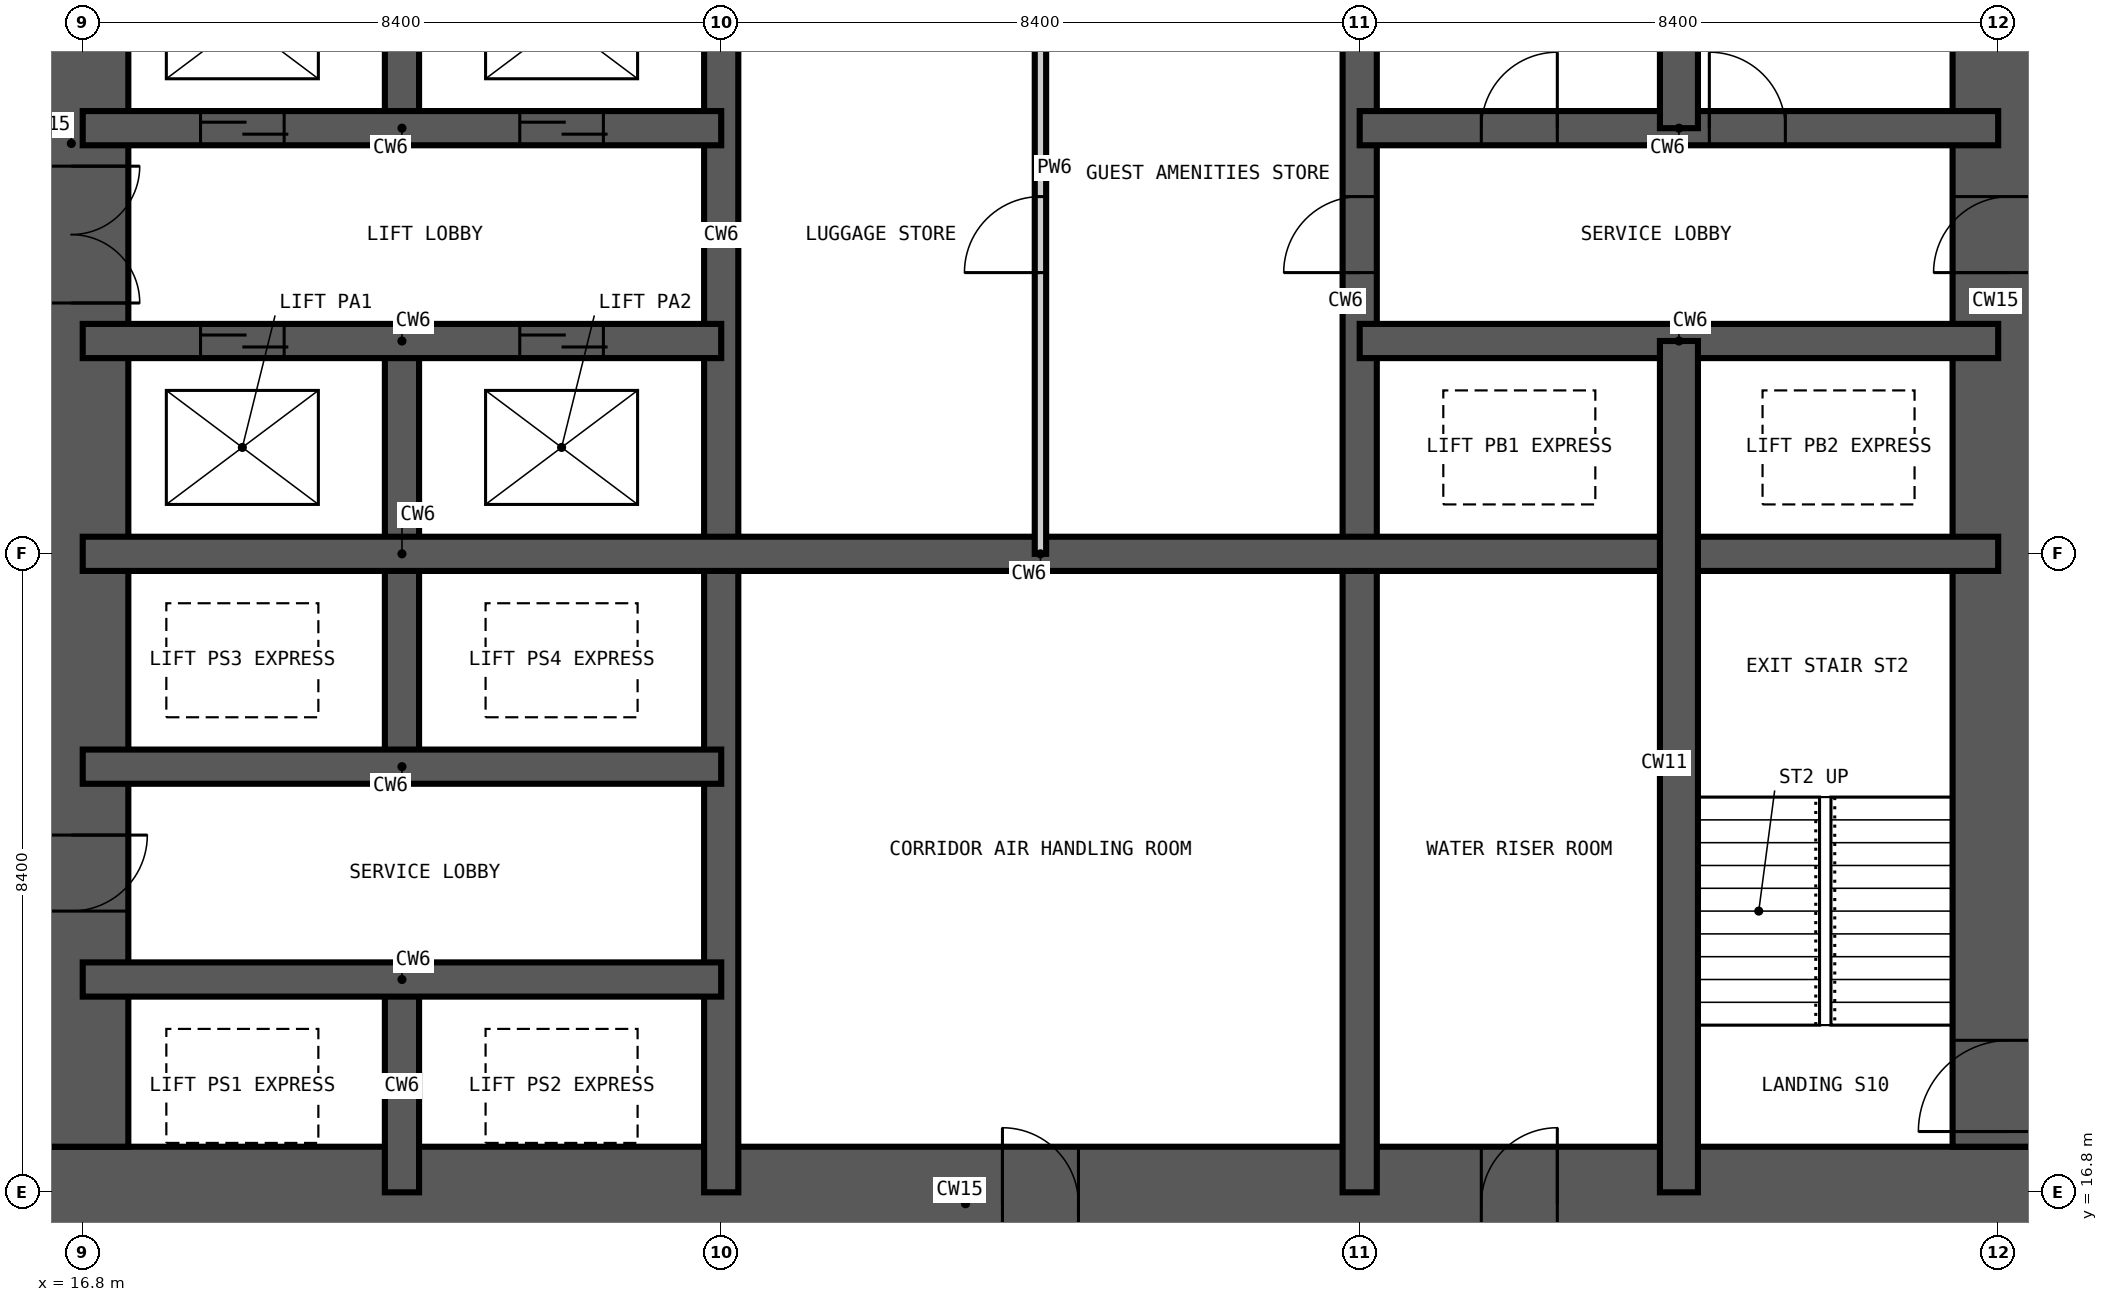
"""IFC4 building model, lengths in metres.
Left out: names, types, materials, properties, quantities, classifications, styles, units other than length and angle.
Written with IfcOpenShell. Run it as: python <this file> out.ifc"""

import sys

from ifc_helpers import new_model, si_unit, direction, frame, frame_2d, origin, place, context, subcontext, project, spatial, rectangle, extrude, element, fill, save


model = new_model("IFC4")
c1 = context("Model", 3, precision=1e-05, world=origin(), true_north=direction((0.0, 1.0)))
c2 = subcontext(c1, "Body", "Model", "MODEL_VIEW")
j1 = project(units=[si_unit("LENGTHUNIT", "METRE"), si_unit("PLANEANGLEUNIT", "RADIAN")], contexts=[c1])
p1 = place(None, origin())
s1 = spatial("IfcSite", under=j1, at=p1, CompositionType="ELEMENT")
p2 = place(p1, origin())
s2 = spatial("IfcBuilding", under=s1, at=p2, CompositionType="ELEMENT")
p3 = place(p2, frame((0.0, 0.0, 81.0)))
s3 = spatial("IfcBuildingStorey", under=s2, at=p3, CompositionType="ELEMENT", Elevation=81.0)
p4 = place(p3, frame((15.9, 16.65, -0.35), z_axis=(0.0, 0.0, 1.0), x_axis=(1.0, 0.0, 0.0)))
e1 = element("IfcWall", 1, at=p4, inside=s3, PredefinedType="SHEAR", context=c2, shape_type="SweptSolid", body=[
    extrude(rectangle(XDim=27.0, YDim=1.5, at=frame_2d((13.5, 0.0))), origin(), (0.0, 0.0, 1.0), 3.6),
])
p5 = place(p4, frame((13.0, 0.0, 0.35)))
e2 = element("IfcOpeningElement", 2, at=p5, cuts=e1, PredefinedType="OPENING", context=c2, shape_type="SweptSolid", body=[
    extrude(rectangle(XDim=1.0, YDim=2.1, at=frame_2d((0.5, 1.05))), frame((0.0, 0.76, 0.0), z_axis=(0.0, -1.0, 0.0), x_axis=(1.0, 0.0, 0.0)), (0.0, 0.0, 1.0), 1.52),
])
p6 = place(p4, frame((19.3, 0.0, 0.35)))
e3 = element("IfcOpeningElement", 3, at=p6, cuts=e1, PredefinedType="OPENING", context=c2, shape_type="SweptSolid", body=[
    extrude(rectangle(XDim=1.0, YDim=2.1, at=frame_2d((0.5, 1.05))), frame((0.0, 0.76, 0.0), z_axis=(0.0, -1.0, 0.0), x_axis=(1.0, 0.0, 0.0)), (0.0, 0.0, 1.0), 1.52),
])
p7 = place(p3, frame((42.15, 17.4, -0.35), z_axis=(0.0, 0.0, 1.0), x_axis=(0.0, 1.0, 0.0)))
e4 = element("IfcWall", 4, at=p7, inside=s3, PredefinedType="SHEAR", context=c2, shape_type="SweptSolid", body=[
    extrude(rectangle(XDim=24.0, YDim=1.5, at=frame_2d((12.0, 0.0))), origin(), (0.0, 0.0, 1.0), 3.6),
])
p8 = place(p7, frame((0.2, 0.0, 0.35)))
e5 = element("IfcOpeningElement", 5, at=p8, cuts=e4, PredefinedType="OPENING", context=c2, shape_type="SweptSolid", body=[
    extrude(rectangle(XDim=1.2, YDim=2.2, at=frame_2d((0.6, 1.1))), frame((0.0, 0.76, 0.0), z_axis=(0.0, -1.0, 0.0), x_axis=(1.0, 0.0, 0.0)), (0.0, 0.0, 1.0), 1.52),
])
p9 = place(p7, frame((11.5, 0.0, 0.35)))
e6 = element("IfcOpeningElement", 6, at=p9, cuts=e4, PredefinedType="OPENING", context=c2, shape_type="SweptSolid", body=[
    extrude(rectangle(XDim=1.0, YDim=2.1, at=frame_2d((0.5, 1.05))), frame((0.0, 0.76, 0.0), z_axis=(0.0, -1.0, 0.0), x_axis=(1.0, 0.0, 0.0)), (0.0, 0.0, 1.0), 1.52),
])
p10 = place(p7, frame((19.9, 0.0, 0.35)))
e7 = element("IfcOpeningElement", 7, at=p10, cuts=e4, PredefinedType="OPENING", context=c2, shape_type="SweptSolid", body=[
    extrude(rectangle(XDim=1.0, YDim=2.1, at=frame_2d((0.5, 1.05))), frame((0.0, 0.76, 0.0), z_axis=(0.0, -1.0, 0.0), x_axis=(1.0, 0.0, 0.0)), (0.0, 0.0, 1.0), 1.52),
])
p11 = place(p3, frame((16.65, 41.4, -0.35), z_axis=(0.0, 0.0, 1.0), x_axis=(0.0, -1.0, 0.0)))
e8 = element("IfcWall", 8, at=p11, inside=s3, PredefinedType="SHEAR", context=c2, shape_type="SweptSolid", body=[
    extrude(rectangle(XDim=24.0, YDim=1.5, at=frame_2d((12.0, 0.0))), origin(), (0.0, 0.0, 1.0), 3.6),
])
p12 = place(p11, frame((11.1, 0.0, 0.35)))
e9 = element("IfcOpeningElement", 9, at=p12, cuts=e8, PredefinedType="OPENING", context=c2, shape_type="SweptSolid", body=[
    extrude(rectangle(XDim=1.8, YDim=2.2, at=frame_2d((0.9, 1.1))), frame((0.0, 0.76, 0.0), z_axis=(0.0, -1.0, 0.0), x_axis=(1.0, 0.0, 0.0)), (0.0, 0.0, 1.0), 1.52),
])
p13 = place(p11, frame((19.9, 0.0, 0.35)))
e10 = element("IfcOpeningElement", 10, at=p13, cuts=e8, PredefinedType="OPENING", context=c2, shape_type="SweptSolid", body=[
    extrude(rectangle(XDim=1.0, YDim=2.1, at=frame_2d((0.5, 1.05))), frame((0.0, 0.76, 0.0), z_axis=(0.0, -1.0, 0.0), x_axis=(1.0, 0.0, 0.0)), (0.0, 0.0, 1.0), 1.52),
])
p14 = place(p11, frame((5.2, 0.0, 0.35)))
e11 = element("IfcOpeningElement", 11, at=p14, cuts=e8, PredefinedType="OPENING", context=c2, shape_type="SweptSolid", body=[
    extrude(rectangle(XDim=1.0, YDim=2.1, at=frame_2d((0.5, 1.05))), frame((0.0, 0.76, 0.0), z_axis=(0.0, -1.0, 0.0), x_axis=(1.0, 0.0, 0.0)), (0.0, 0.0, 1.0), 1.52),
])
p15 = place(p3, frame((21.0, 16.8, -0.35), z_axis=(0.0, 0.0, 1.0), x_axis=(0.0, 1.0, 0.0)))
e12 = element("IfcWall", 12, at=p15, inside=s3, PredefinedType="SHEAR", context=c2, shape_type="SweptSolid", body=[
    extrude(rectangle(XDim=2.8, YDim=0.45, at=frame_2d((1.4, 0.0))), origin(), (0.0, 0.0, 1.0), 3.6),
])
p16 = place(p3, frame((21.0, 22.4, -0.35), z_axis=(0.0, 0.0, 1.0), x_axis=(0.0, 1.0, 0.0)))
e13 = element("IfcWall", 13, at=p16, inside=s3, PredefinedType="SHEAR", context=c2, shape_type="SweptSolid", body=[
    extrude(rectangle(XDim=5.6, YDim=0.45, at=frame_2d((2.8, 0.0))), origin(), (0.0, 0.0, 1.0), 3.6),
])
p17 = place(p3, frame((21.0, 30.8, -0.35), z_axis=(0.0, 0.0, 1.0), x_axis=(0.0, 1.0, 0.0)))
e14 = element("IfcWall", 14, at=p17, inside=s3, PredefinedType="SHEAR", context=c2, shape_type="SweptSolid", body=[
    extrude(rectangle(XDim=2.8, YDim=0.45, at=frame_2d((1.4, 0.0))), origin(), (0.0, 0.0, 1.0), 3.6),
])
p18 = place(p3, frame((25.2, 16.8, -0.35), z_axis=(0.0, 0.0, 1.0), x_axis=(0.0, 1.0, 0.0)))
e15 = element("IfcWall", 15, at=p18, inside=s3, PredefinedType="SHEAR", context=c2, shape_type="SweptSolid", body=[
    extrude(rectangle(XDim=25.2, YDim=0.45, at=frame_2d((12.6, 0.0))), origin(), (0.0, 0.0, 1.0), 3.6),
])
p19 = place(p3, frame((33.6, 16.8, -0.35), z_axis=(0.0, 0.0, 1.0), x_axis=(0.0, 1.0, 0.0)))
e16 = element("IfcWall", 16, at=p19, inside=s3, PredefinedType="SHEAR", context=c2, shape_type="SweptSolid", body=[
    extrude(rectangle(XDim=25.2, YDim=0.45, at=frame_2d((12.6, 0.0))), origin(), (0.0, 0.0, 1.0), 3.6),
])
p20 = place(p19, frame((22.5, 0.0, 0.35)))
e17 = element("IfcOpeningElement", 17, at=p20, cuts=e16, PredefinedType="OPENING", context=c2, shape_type="SweptSolid", body=[
    extrude(rectangle(XDim=1.2, YDim=2.2, at=frame_2d((0.6, 1.1))), frame((0.0, 0.235, 0.0), z_axis=(0.0, -1.0, 0.0), x_axis=(1.0, 0.0, 0.0)), (0.0, 0.0, 1.0), 0.47),
])
p21 = place(p19, frame((18.3, 0.0, 0.35)))
e18 = element("IfcOpeningElement", 18, at=p21, cuts=e16, PredefinedType="OPENING", context=c2, shape_type="SweptSolid", body=[
    extrude(rectangle(XDim=1.2, YDim=2.2, at=frame_2d((0.6, 1.1))), frame((0.0, 0.235, 0.0), z_axis=(0.0, -1.0, 0.0), x_axis=(1.0, 0.0, 0.0)), (0.0, 0.0, 1.0), 0.47),
])
p22 = place(p19, frame((12.1, 0.0, 0.35)))
e19 = element("IfcOpeningElement", 19, at=p22, cuts=e16, PredefinedType="OPENING", context=c2, shape_type="SweptSolid", body=[
    extrude(rectangle(XDim=1.0, YDim=2.1, at=frame_2d((0.5, 1.05))), frame((0.0, 0.235, 0.0), z_axis=(0.0, -1.0, 0.0), x_axis=(1.0, 0.0, 0.0)), (0.0, 0.0, 1.0), 0.47),
])
for number, where, z_axis, x_axis in (
    (20, (16.8, 19.6, -0.35), (0.0, 0.0, 1.0), (1.0, 0.0, 0.0)),
    (21, (16.8, 22.4, -0.35), (0.0, 0.0, 1.0), (1.0, 0.0, 0.0)),
):
    element("IfcWall", number, at=place(p3, frame(where, z_axis=z_axis, x_axis=x_axis)), inside=s3, PredefinedType="SHEAR", context=c2, shape_type="SweptSolid", body=[
        extrude(rectangle(XDim=8.4, YDim=0.45, at=frame_2d((4.2, 0.0))), origin(), (0.0, 0.0, 1.0), 3.6),
    ])
p23 = place(p3, frame((16.8, 25.2, -0.35), z_axis=(0.0, 0.0, 1.0), x_axis=(1.0, 0.0, 0.0)))
e22 = element("IfcWall", 22, at=p23, inside=s3, PredefinedType="SHEAR", context=c2, shape_type="SweptSolid", body=[
    extrude(rectangle(XDim=25.2, YDim=0.45, at=frame_2d((12.6, 0.0))), origin(), (0.0, 0.0, 1.0), 3.6),
])
p24 = place(p3, frame((16.8, 28.0, -0.35), z_axis=(0.0, 0.0, 1.0), x_axis=(1.0, 0.0, 0.0)))
e23 = element("IfcWall", 23, at=p24, inside=s3, PredefinedType="SHEAR", context=c2, shape_type="SweptSolid", body=[
    extrude(rectangle(XDim=8.4, YDim=0.45, at=frame_2d((4.2, 0.0))), origin(), (0.0, 0.0, 1.0), 3.6),
])
p25 = place(p24, frame((1.55, 0.0, 0.35)))
e24 = element("IfcOpeningElement", 24, at=p25, cuts=e23, PredefinedType="OPENING", context=c2, shape_type="SweptSolid", body=[
    extrude(rectangle(XDim=1.1, YDim=2.2, at=frame_2d((0.55, 1.1))), frame((0.0, 0.235, 0.0), z_axis=(0.0, -1.0, 0.0), x_axis=(1.0, 0.0, 0.0)), (0.0, 0.0, 1.0), 0.47),
])
p26 = place(p24, frame((5.75, 0.0, 0.35)))
e25 = element("IfcOpeningElement", 25, at=p26, cuts=e23, PredefinedType="OPENING", context=c2, shape_type="SweptSolid", body=[
    extrude(rectangle(XDim=1.1, YDim=2.2, at=frame_2d((0.55, 1.1))), frame((0.0, 0.235, 0.0), z_axis=(0.0, -1.0, 0.0), x_axis=(1.0, 0.0, 0.0)), (0.0, 0.0, 1.0), 0.47),
])
p27 = place(p3, frame((33.6, 28.0, -0.35), z_axis=(0.0, 0.0, 1.0), x_axis=(1.0, 0.0, 0.0)))
e26 = element("IfcWall", 26, at=p27, inside=s3, PredefinedType="SHEAR", context=c2, shape_type="SweptSolid", body=[
    extrude(rectangle(XDim=8.4, YDim=0.45, at=frame_2d((4.2, 0.0))), origin(), (0.0, 0.0, 1.0), 3.6),
])
p28 = place(p3, frame((16.8, 30.8, -0.35), z_axis=(0.0, 0.0, 1.0), x_axis=(1.0, 0.0, 0.0)))
e27 = element("IfcWall", 27, at=p28, inside=s3, PredefinedType="SHEAR", context=c2, shape_type="SweptSolid", body=[
    extrude(rectangle(XDim=8.4, YDim=0.45, at=frame_2d((4.2, 0.0))), origin(), (0.0, 0.0, 1.0), 3.6),
])
p29 = place(p28, frame((1.55, 0.0, 0.35)))
e28 = element("IfcOpeningElement", 28, at=p29, cuts=e27, PredefinedType="OPENING", context=c2, shape_type="SweptSolid", body=[
    extrude(rectangle(XDim=1.1, YDim=2.2, at=frame_2d((0.55, 1.1))), frame((0.0, 0.235, 0.0), z_axis=(0.0, -1.0, 0.0), x_axis=(1.0, 0.0, 0.0)), (0.0, 0.0, 1.0), 0.47),
])
p30 = place(p28, frame((5.75, 0.0, 0.35)))
e29 = element("IfcOpeningElement", 29, at=p30, cuts=e27, PredefinedType="OPENING", context=c2, shape_type="SweptSolid", body=[
    extrude(rectangle(XDim=1.1, YDim=2.2, at=frame_2d((0.55, 1.1))), frame((0.0, 0.235, 0.0), z_axis=(0.0, -1.0, 0.0), x_axis=(1.0, 0.0, 0.0)), (0.0, 0.0, 1.0), 0.47),
])
p31 = place(p3, frame((33.6, 30.8, -0.35), z_axis=(0.0, 0.0, 1.0), x_axis=(1.0, 0.0, 0.0)))
e30 = element("IfcWall", 30, at=p31, inside=s3, PredefinedType="SHEAR", context=c2, shape_type="SweptSolid", body=[
    extrude(rectangle(XDim=8.4, YDim=0.45, at=frame_2d((4.2, 0.0))), origin(), (0.0, 0.0, 1.0), 3.6),
])
p32 = place(p31, frame((1.6, 0.0, 0.35)))
e31 = element("IfcOpeningElement", 31, at=p32, cuts=e30, PredefinedType="OPENING", context=c2, shape_type="SweptSolid", body=[
    extrude(rectangle(XDim=1.0, YDim=2.1, at=frame_2d((0.5, 1.05))), frame((0.0, 0.235, 0.0), z_axis=(0.0, -1.0, 0.0), x_axis=(1.0, 0.0, 0.0)), (0.0, 0.0, 1.0), 0.47),
])
p33 = place(p31, frame((4.6, 0.0, 0.35)))
e32 = element("IfcOpeningElement", 32, at=p33, cuts=e30, PredefinedType="OPENING", context=c2, shape_type="SweptSolid", body=[
    extrude(rectangle(XDim=1.0, YDim=2.1, at=frame_2d((0.5, 1.05))), frame((0.0, 0.235, 0.0), z_axis=(0.0, -1.0, 0.0), x_axis=(1.0, 0.0, 0.0)), (0.0, 0.0, 1.0), 0.47),
])
p34 = place(p3, frame((37.8, 16.8, -0.35), z_axis=(0.0, 0.0, 1.0), x_axis=(0.0, 1.0, 0.0)))
e33 = element("IfcWall", 33, at=p34, inside=s3, PredefinedType="SHEAR", context=c2, shape_type="SweptSolid", body=[
    extrude(rectangle(XDim=11.2, YDim=0.5, at=frame_2d((5.6, 0.0))), origin(), (0.0, 0.0, 1.0), 3.6),
])
p35 = place(p3, frame((37.8, 30.8, -0.35), z_axis=(0.0, 0.0, 1.0), x_axis=(0.0, 1.0, 0.0)))
e34 = element("IfcWall", 34, at=p35, inside=s3, PredefinedType="SHEAR", context=c2, shape_type="SweptSolid", body=[
    extrude(rectangle(XDim=2.8, YDim=0.5, at=frame_2d((1.4, 0.0))), origin(), (0.0, 0.0, 1.0), 3.6),
])
p36 = place(p3, frame((29.4, 25.2, 0.0), z_axis=(0.0, 0.0, 1.0), x_axis=(0.0, 1.0, 0.0)))
e35 = element("IfcWall", 35, at=p36, inside=s3, PredefinedType="PARTITIONING", context=c2, shape_type="SweptSolid", body=[
    extrude(rectangle(XDim=8.4, YDim=0.15, at=frame_2d((4.2, 0.0))), origin(), (0.0, 0.0, 1.0), 3.25),
])
p37 = place(p36, frame((3.7, 0.0, 0.0)))
e36 = element("IfcOpeningElement", 36, at=p37, cuts=e35, PredefinedType="OPENING", context=c2, shape_type="SweptSolid", body=[
    extrude(rectangle(XDim=1.0, YDim=2.1, at=frame_2d((0.5, 1.05))), frame((0.0, 0.085, 0.0), z_axis=(0.0, -1.0, 0.0), x_axis=(1.0, 0.0, 0.0)), (0.0, 0.0, 1.0), 0.17),
])
p38 = place(p8, origin())
e37 = element("IfcDoor", 37, at=p38, inside=s3, OperationType="SINGLE_SWING_LEFT", PredefinedType="DOOR", context=c2, shape_type="SweptSolid", body=[
    extrude(rectangle(XDim=1.2, YDim=2.2, at=frame_2d((0.6, 1.1))), frame((0.0, 0.025, 0.0), z_axis=(0.0, -1.0, 0.0), x_axis=(1.0, 0.0, 0.0)), (0.0, 0.0, 1.0), 0.05),
])
fill(e5, e37)
p39 = place(p25, origin())
e38 = element("IfcDoor", 38, at=p39, inside=s3, OperationType="DOUBLE_DOOR_SLIDING", PredefinedType="DOOR", context=c2, shape_type="SweptSolid", body=[
    extrude(rectangle(XDim=1.1, YDim=2.2, at=frame_2d((0.55, 1.1))), frame((0.0, 0.025, 0.0), z_axis=(0.0, -1.0, 0.0), x_axis=(1.0, 0.0, 0.0)), (0.0, 0.0, 1.0), 0.05),
])
fill(e24, e38)
p40 = place(p26, origin())
e39 = element("IfcDoor", 39, at=p40, inside=s3, OperationType="DOUBLE_DOOR_SLIDING", PredefinedType="DOOR", context=c2, shape_type="SweptSolid", body=[
    extrude(rectangle(XDim=1.1, YDim=2.2, at=frame_2d((0.55, 1.1))), frame((0.0, 0.025, 0.0), z_axis=(0.0, -1.0, 0.0), x_axis=(1.0, 0.0, 0.0)), (0.0, 0.0, 1.0), 0.05),
])
fill(e25, e39)
p41 = place(p29, origin())
e40 = element("IfcDoor", 40, at=p41, inside=s3, OperationType="DOUBLE_DOOR_SLIDING", PredefinedType="DOOR", context=c2, shape_type="SweptSolid", body=[
    extrude(rectangle(XDim=1.1, YDim=2.2, at=frame_2d((0.55, 1.1))), frame((0.0, 0.025, 0.0), z_axis=(0.0, -1.0, 0.0), x_axis=(1.0, 0.0, 0.0)), (0.0, 0.0, 1.0), 0.05),
])
fill(e28, e40)
p42 = place(p30, origin())
e41 = element("IfcDoor", 41, at=p42, inside=s3, OperationType="DOUBLE_DOOR_SLIDING", PredefinedType="DOOR", context=c2, shape_type="SweptSolid", body=[
    extrude(rectangle(XDim=1.1, YDim=2.2, at=frame_2d((0.55, 1.1))), frame((0.0, 0.025, 0.0), z_axis=(0.0, -1.0, 0.0), x_axis=(1.0, 0.0, 0.0)), (0.0, 0.0, 1.0), 0.05),
])
fill(e29, e41)
p43 = place(p12, origin())
e42 = element("IfcDoor", 42, at=p43, inside=s3, OperationType="DOUBLE_DOOR_DOUBLE_SWING", PredefinedType="DOOR", context=c2, shape_type="SweptSolid", body=[
    extrude(rectangle(XDim=1.8, YDim=2.2, at=frame_2d((0.9, 1.1))), frame((0.0, 0.025, 0.0), z_axis=(0.0, -1.0, 0.0), x_axis=(1.0, 0.0, 0.0)), (0.0, 0.0, 1.0), 0.05),
])
fill(e9, e42)
p44 = place(p13, origin())
e43 = element("IfcDoor", 43, at=p44, inside=s3, OperationType="SINGLE_SWING_LEFT", PredefinedType="DOOR", context=c2, shape_type="SweptSolid", body=[
    extrude(rectangle(XDim=1.0, YDim=2.1, at=frame_2d((0.5, 1.05))), frame((0.0, 0.025, 0.0), z_axis=(0.0, -1.0, 0.0), x_axis=(1.0, 0.0, 0.0)), (0.0, 0.0, 1.0), 0.05),
])
fill(e10, e43)
p45 = place(p22, origin())
e44 = element("IfcDoor", 44, at=p45, inside=s3, OperationType="SINGLE_SWING_LEFT", PredefinedType="DOOR", context=c2, shape_type="SweptSolid", body=[
    extrude(rectangle(XDim=1.0, YDim=2.1, at=frame_2d((0.5, 1.05))), frame((0.0, 0.025, 0.0), z_axis=(0.0, -1.0, 0.0), x_axis=(1.0, 0.0, 0.0)), (0.0, 0.0, 1.0), 0.05),
])
fill(e19, e44)
p46 = place(p37, origin())
e45 = element("IfcDoor", 45, at=p46, inside=s3, OperationType="SINGLE_SWING_LEFT", PredefinedType="DOOR", context=c2, shape_type="SweptSolid", body=[
    extrude(rectangle(XDim=1.0, YDim=2.1, at=frame_2d((0.5, 1.05))), frame((0.0, 0.025, 0.0), z_axis=(0.0, -1.0, 0.0), x_axis=(1.0, 0.0, 0.0)), (0.0, 0.0, 1.0), 0.05),
])
fill(e36, e45)
p47 = place(p32, origin())
e46 = element("IfcDoor", 46, at=p47, inside=s3, OperationType="SINGLE_SWING_RIGHT", PredefinedType="DOOR", context=c2, shape_type="SweptSolid", body=[
    extrude(rectangle(XDim=1.0, YDim=2.1, at=frame_2d((0.5, 1.05))), frame((0.0, 0.025, 0.0), z_axis=(0.0, -1.0, 0.0), x_axis=(1.0, 0.0, 0.0)), (0.0, 0.0, 1.0), 0.05),
])
fill(e31, e46)
p48 = place(p33, origin())
e47 = element("IfcDoor", 47, at=p48, inside=s3, OperationType="SINGLE_SWING_LEFT", PredefinedType="DOOR", context=c2, shape_type="SweptSolid", body=[
    extrude(rectangle(XDim=1.0, YDim=2.1, at=frame_2d((0.5, 1.05))), frame((0.0, 0.025, 0.0), z_axis=(0.0, -1.0, 0.0), x_axis=(1.0, 0.0, 0.0)), (0.0, 0.0, 1.0), 0.05),
])
fill(e32, e47)
p49 = place(p9, origin())
e48 = element("IfcDoor", 48, at=p49, inside=s3, OperationType="SINGLE_SWING_LEFT", PredefinedType="DOOR", context=c2, shape_type="SweptSolid", body=[
    extrude(rectangle(XDim=1.0, YDim=2.1, at=frame_2d((0.5, 1.05))), frame((0.0, 0.025, 0.0), z_axis=(0.0, -1.0, 0.0), x_axis=(1.0, 0.0, 0.0)), (0.0, 0.0, 1.0), 0.05),
])
fill(e6, e48)
p50 = place(p5, origin())
e49 = element("IfcDoor", 49, at=p50, inside=s3, OperationType="SINGLE_SWING_LEFT", PredefinedType="DOOR", context=c2, shape_type="SweptSolid", body=[
    extrude(rectangle(XDim=1.0, YDim=2.1, at=frame_2d((0.5, 1.05))), frame((0.0, 0.025, 0.0), z_axis=(0.0, -1.0, 0.0), x_axis=(1.0, 0.0, 0.0)), (0.0, 0.0, 1.0), 0.05),
])
fill(e2, e49)
p51 = place(p6, origin())
e50 = element("IfcDoor", 50, at=p51, inside=s3, OperationType="SINGLE_SWING_RIGHT", PredefinedType="DOOR", context=c2, shape_type="SweptSolid", body=[
    extrude(rectangle(XDim=1.0, YDim=2.1, at=frame_2d((0.5, 1.05))), frame((0.0, 0.025, 0.0), z_axis=(0.0, -1.0, 0.0), x_axis=(1.0, 0.0, 0.0)), (0.0, 0.0, 1.0), 0.05),
])
fill(e3, e50)
save(model, sys.argv[1])
